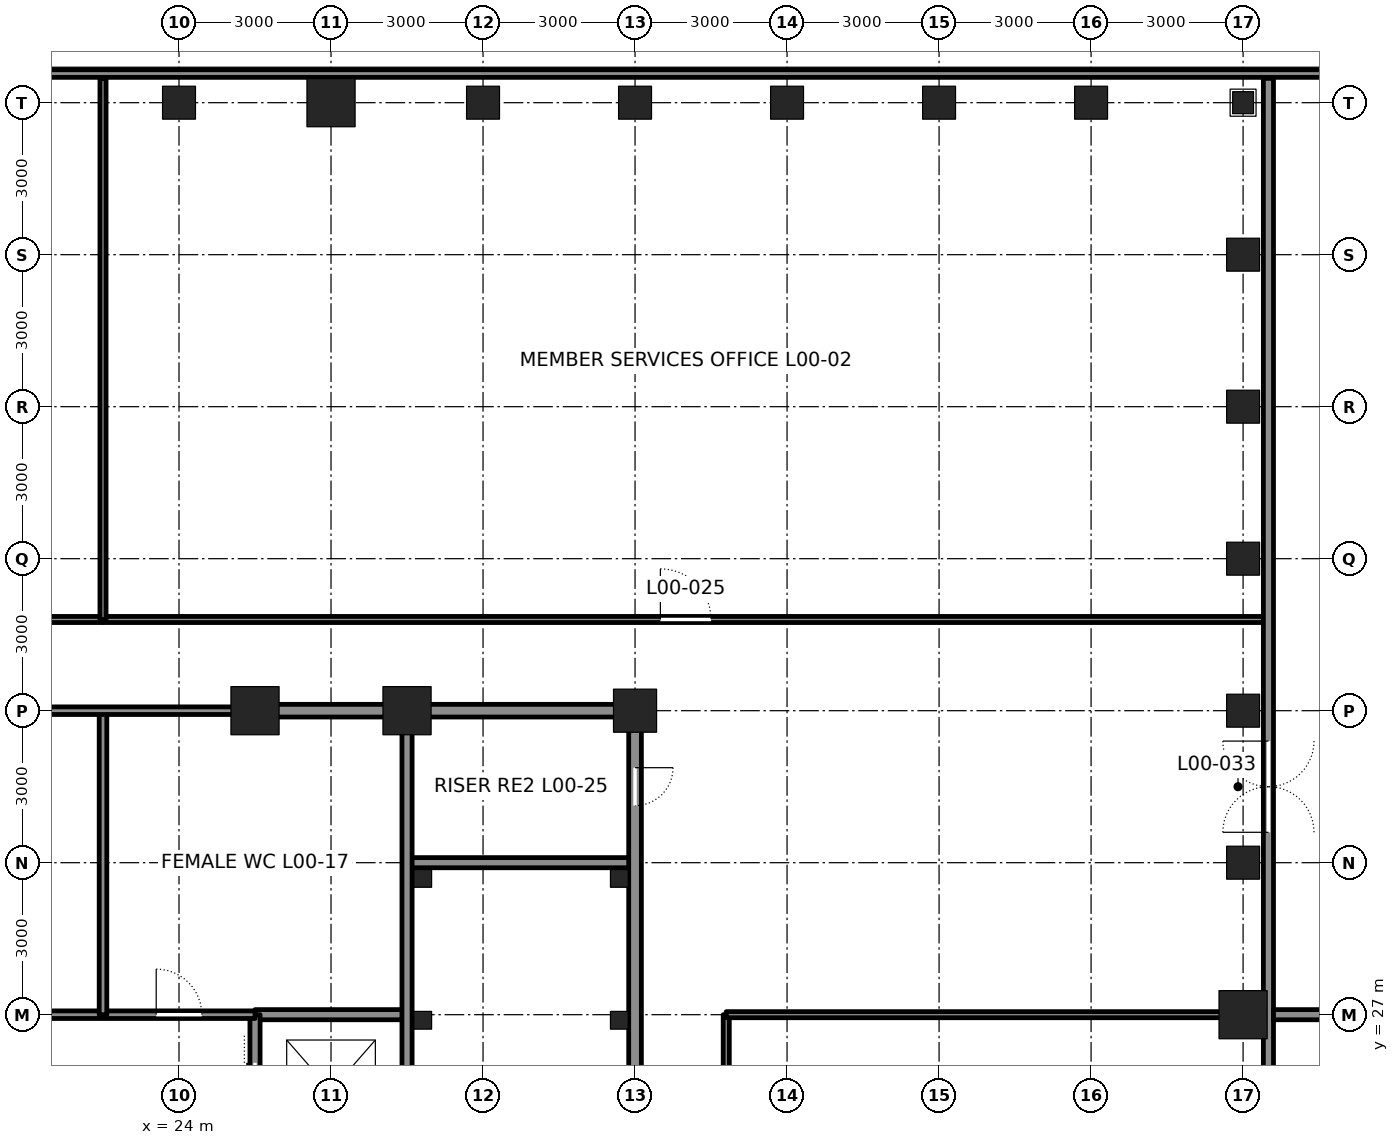
"""IFC4 building model, lengths in metres.
Left out: names, types, materials, properties, quantities, classifications, styles, units other than length and angle.
Written with IfcOpenShell. Run it as: python <this file> out.ifc"""

import sys

from ifc_helpers import new_model, si_unit, direction, frame, frame_2d, origin, origin_2d, place, context, subcontext, project, spatial, rectangle, hollow_rectangle, i_section, extrude, element, fill, save


model = new_model("IFC4")
c1 = context("Model", 3, precision=1e-05, world=origin(), true_north=direction((0.0, 1.0)))
c2 = subcontext(c1, "Body", "Model", "MODEL_VIEW")
j1 = project(units=[si_unit("LENGTHUNIT", "METRE"), si_unit("PLANEANGLEUNIT", "RADIAN")], contexts=[c1])
p1 = place(None, origin())
s1 = spatial("IfcSite", under=j1, at=p1, CompositionType="ELEMENT")
p2 = place(p1, origin())
s2 = spatial("IfcBuilding", under=s1, at=p2, CompositionType="ELEMENT")
p3 = place(p2, origin())
s3 = spatial("IfcBuildingStorey", under=s2, at=p3, CompositionType="ELEMENT", Elevation=0.0)
p4 = place(p3, frame((45.0, 27.0, 0.0), z_axis=(0.0, 0.0, 1.0), x_axis=(1.0, 0.0, 0.0)))
e1 = element("IfcColumn", 1, at=p4, inside=s3, PredefinedType="COLUMN", context=c2, shape_type="SweptSolid", body=[
    extrude(hollow_rectangle(XDim=0.95, YDim=0.95, WallThickness=0.11, at=origin_2d()), origin(), (0.0, 0.0, 1.0), 6.0),
])
for number, where, z_axis, x_axis in (
    (2, (45.0, 30.0, 0.0), (0.0, 0.0, 1.0), (1.0, 0.0, 0.0)),
    (3, (45.0, 33.0, 0.0), (0.0, 0.0, 1.0), (1.0, 0.0, 0.0)),
    (4, (45.0, 36.0, 0.0), (0.0, 0.0, 1.0), (1.0, 0.0, 0.0)),
    (5, (45.0, 39.0, 0.0), (0.0, 0.0, 1.0), (1.0, 0.0, 0.0)),
    (6, (45.0, 42.0, 0.0), (0.0, 0.0, 1.0), (1.0, 0.0, 0.0)),
    (7, (42.0, 45.0, 0.0), (0.0, 0.0, 1.0), (0.0, 1.0, 0.0)),
    (8, (39.0, 45.0, 0.0), (0.0, 0.0, 1.0), (0.0, 1.0, 0.0)),
    (9, (36.0, 45.0, 0.0), (0.0, 0.0, 1.0), (0.0, 1.0, 0.0)),
    (10, (33.0, 45.0, 0.0), (0.0, 0.0, 1.0), (0.0, 1.0, 0.0)),
    (11, (30.0, 45.0, 0.0), (0.0, 0.0, 1.0), (0.0, 1.0, 0.0)),
):
    element("IfcColumn", number, at=place(p3, frame(where, z_axis=z_axis, x_axis=x_axis)), inside=s3, PredefinedType="COLUMN", context=c2, shape_type="SweptSolid", body=[
        extrude(hollow_rectangle(XDim=0.65, YDim=0.65, WallThickness=0.065, at=origin_2d()), origin(), (0.0, 0.0, 1.0), 6.0),
    ])
p5 = place(p3, frame((27.0, 45.0, 0.0), z_axis=(0.0, 0.0, 1.0), x_axis=(0.0, 1.0, 0.0)))
e12 = element("IfcColumn", 12, at=p5, inside=s3, PredefinedType="COLUMN", context=c2, shape_type="SweptSolid", body=[
    extrude(hollow_rectangle(XDim=0.95, YDim=0.95, WallThickness=0.11, at=origin_2d()), origin(), (0.0, 0.0, 1.0), 6.0),
])
p6 = place(p3, frame((24.0, 45.0, 0.0), z_axis=(0.0, 0.0, 1.0), x_axis=(0.0, 1.0, 0.0)))
e13 = element("IfcColumn", 13, at=p6, inside=s3, PredefinedType="COLUMN", context=c2, shape_type="SweptSolid", body=[
    extrude(hollow_rectangle(XDim=0.65, YDim=0.65, WallThickness=0.065, at=origin_2d()), origin(), (0.0, 0.0, 1.0), 6.0),
])
for number, where, z_axis, x_axis in (
    (14, (25.5, 33.0, 0.0), (0.0, 0.0, 1.0), (1.0, 0.0, 0.0)),
    (15, (28.5, 33.0, 0.0), (0.0, 0.0, 1.0), (1.0, 0.0, 0.0)),
):
    element("IfcColumn", number, at=place(p3, frame(where, z_axis=z_axis, x_axis=x_axis)), inside=s3, PredefinedType="COLUMN", context=c2, shape_type="SweptSolid", body=[
        extrude(hollow_rectangle(XDim=0.95, YDim=0.95, WallThickness=0.095, at=origin_2d()), origin(), (0.0, 0.0, 1.0), 6.0),
    ])
p7 = place(p3, frame((33.0, 33.0, 0.0), z_axis=(0.0, 0.0, 1.0), x_axis=(1.0, 0.0, 0.0)))
e16 = element("IfcColumn", 16, at=p7, inside=s3, PredefinedType="COLUMN", context=c2, shape_type="SweptSolid", body=[
    extrude(hollow_rectangle(XDim=0.85, YDim=0.85, WallThickness=0.085, at=origin_2d()), origin(), (0.0, 0.0, 1.0), 6.0),
])
p8 = place(p3, frame((45.0, 45.0, 0.0), z_axis=(0.0, 0.0, 1.0), x_axis=(1.0, 0.0, 0.0)))
e17 = element("IfcColumn", 17, at=p8, inside=s3, PredefinedType="COLUMN", context=c2, shape_type="SweptSolid", body=[
    extrude(i_section(OverallWidth=0.411, OverallDepth=0.434, WebThickness=0.036, FlangeThickness=0.057, at=origin_2d()), origin(), (0.0, 0.0, 1.0), 6.0),
])
p9 = place(p3, frame((54.5, 45.575, 0.0), z_axis=(0.0, 0.0, 1.0), x_axis=(-1.0, 0.0, 0.0)))
e18 = element("IfcWall", 18, at=p9, inside=s3, PredefinedType="SOLIDWALL", context=c2, shape_type="SweptSolid", body=[
    extrude(rectangle(XDim=64.0, YDim=0.15, at=frame_2d((32.0, 0.0))), origin(), (0.0, 0.0, 1.0), 5.8),
])
p10 = place(p9, frame((56.9, 0.0, 0.0)))
e19 = element("IfcOpeningElement", 19, at=p10, cuts=e18, PredefinedType="OPENING", context=c2, shape_type="SweptSolid", body=[
    extrude(rectangle(XDim=1.2, YDim=2.1, at=frame_2d((0.6, 1.05))), frame((0.0, 0.085, 0.0), z_axis=(0.0, -1.0, 0.0), x_axis=(1.0, 0.0, 0.0)), (0.0, 0.0, 1.0), 0.17),
])
p11 = place(p9, frame((5.9, 0.0, 0.0)))
e20 = element("IfcOpeningElement", 20, at=p11, cuts=e18, PredefinedType="OPENING", context=c2, shape_type="SweptSolid", body=[
    extrude(rectangle(XDim=1.2, YDim=2.1, at=frame_2d((0.6, 1.05))), frame((0.0, 0.085, 0.0), z_axis=(0.0, -1.0, 0.0), x_axis=(1.0, 0.0, 0.0)), (0.0, 0.0, 1.0), 0.17),
])
p12 = place(p3, frame((25.5, 27.0, 0.0), z_axis=(0.0, 0.0, 1.0), x_axis=(1.0, 0.0, 0.0)))
e21 = element("IfcWall", 21, at=p12, inside=s3, PredefinedType="SOLIDWALL", context=c2, shape_type="SweptSolid", body=[
    extrude(rectangle(XDim=3.0, YDim=0.2, at=frame_2d((1.5, 0.0))), origin(), (0.0, 0.0, 1.0), 5.8),
])
p13 = place(p3, frame((28.5, 30.0, 0.0), z_axis=(0.0, 0.0, 1.0), x_axis=(1.0, 0.0, 0.0)))
e22 = element("IfcWall", 22, at=p13, inside=s3, PredefinedType="SOLIDWALL", context=c2, shape_type="SweptSolid", body=[
    extrude(rectangle(XDim=4.5, YDim=0.2, at=frame_2d((2.25, 0.0))), origin(), (0.0, 0.0, 1.0), 5.8),
])
p14 = place(p3, frame((25.75, 33.0, 0.0), z_axis=(0.0, 0.0, 1.0), x_axis=(1.0, 0.0, 0.0)))
e23 = element("IfcWall", 23, at=p14, inside=s3, PredefinedType="SOLIDWALL", context=c2, shape_type="SweptSolid", body=[
    extrude(rectangle(XDim=2.5, YDim=0.25, at=frame_2d((1.25, 0.0))), origin(), (0.0, 0.0, 1.0), 4.941),
])
p15 = place(p3, frame((28.75, 33.0, 0.0), z_axis=(0.0, 0.0, 1.0), x_axis=(1.0, 0.0, 0.0)))
e24 = element("IfcWall", 24, at=p15, inside=s3, PredefinedType="SOLIDWALL", context=c2, shape_type="SweptSolid", body=[
    extrude(rectangle(XDim=4.0, YDim=0.25, at=frame_2d((2.0, 0.0))), origin(), (0.0, 0.0, 1.0), 4.941),
])
p16 = place(p3, frame((25.5, 15.0, 0.0), z_axis=(0.0, 0.0, 1.0), x_axis=(0.0, 1.0, 0.0)))
e25 = element("IfcWall", 25, at=p16, inside=s3, PredefinedType="SOLIDWALL", context=c2, shape_type="SweptSolid", body=[
    extrude(rectangle(XDim=12.0, YDim=0.2, at=frame_2d((6.0, 0.0))), origin(), (0.0, 0.0, 1.0), 4.825),
])
p17 = place(p16, frame((0.95, 0.0, 0.0)))
e26 = element("IfcOpeningElement", 26, at=p17, cuts=e25, PredefinedType="OPENING", context=c2, shape_type="SweptSolid", body=[
    extrude(rectangle(XDim=1.1, YDim=2.1, at=frame_2d((0.55, 1.05))), frame((0.0, 0.11, 0.0), z_axis=(0.0, -1.0, 0.0), x_axis=(1.0, 0.0, 0.0)), (0.0, 0.0, 1.0), 0.22),
])
p18 = place(p16, frame((3.95, 0.0, 0.0)))
e27 = element("IfcOpeningElement", 27, at=p18, cuts=e25, PredefinedType="OPENING", context=c2, shape_type="SweptSolid", body=[
    extrude(rectangle(XDim=1.1, YDim=2.1, at=frame_2d((0.55, 1.05))), frame((0.0, 0.11, 0.0), z_axis=(0.0, -1.0, 0.0), x_axis=(1.0, 0.0, 0.0)), (0.0, 0.0, 1.0), 0.22),
])
p19 = place(p16, frame((6.95, 0.0, 0.0)))
e28 = element("IfcOpeningElement", 28, at=p19, cuts=e25, PredefinedType="OPENING", context=c2, shape_type="SweptSolid", body=[
    extrude(rectangle(XDim=1.1, YDim=2.1, at=frame_2d((0.55, 1.05))), frame((0.0, 0.11, 0.0), z_axis=(0.0, -1.0, 0.0), x_axis=(1.0, 0.0, 0.0)), (0.0, 0.0, 1.0), 0.22),
])
p20 = place(p16, frame((9.95, 0.0, 0.0)))
e29 = element("IfcOpeningElement", 29, at=p20, cuts=e25, PredefinedType="OPENING", context=c2, shape_type="SweptSolid", body=[
    extrude(rectangle(XDim=1.1, YDim=2.1, at=frame_2d((0.55, 1.05))), frame((0.0, 0.11, 0.0), z_axis=(0.0, -1.0, 0.0), x_axis=(1.0, 0.0, 0.0)), (0.0, 0.0, 1.0), 0.22),
])
p21 = place(p3, frame((28.5, 24.25, 0.0), z_axis=(0.0, 0.0, 1.0), x_axis=(0.0, 1.0, 0.0)))
e30 = element("IfcWall", 30, at=p21, inside=s3, PredefinedType="SOLIDWALL", context=c2, shape_type="SweptSolid", body=[
    extrude(rectangle(XDim=8.5, YDim=0.2, at=frame_2d((4.25, 0.0))), origin(), (0.0, 0.0, 1.0), 4.873),
])
p22 = place(p3, frame((33.0, 24.25, 0.0), z_axis=(0.0, 0.0, 1.0), x_axis=(0.0, 1.0, 0.0)))
e31 = element("IfcWall", 31, at=p22, inside=s3, PredefinedType="SOLIDWALL", context=c2, shape_type="SweptSolid", body=[
    extrude(rectangle(XDim=8.5, YDim=0.25, at=frame_2d((4.25, 0.0))), origin(), (0.0, 0.0, 1.0), 4.873),
])
p23 = place(p22, frame((6.875, 0.0, 0.0)))
e32 = element("IfcOpeningElement", 32, at=p23, cuts=e31, PredefinedType="OPENING", context=c2, shape_type="SweptSolid", body=[
    extrude(rectangle(XDim=0.75, YDim=2.1, at=frame_2d((0.375, 1.05))), frame((0.0, 0.135, 0.0), z_axis=(0.0, -1.0, 0.0), x_axis=(1.0, 0.0, 0.0)), (0.0, 0.0, 1.0), 0.27),
])
p24 = place(p3, frame((19.5, 27.0, 0.0), z_axis=(0.0, 0.0, 1.0), x_axis=(1.0, 0.0, 0.0)))
e33 = element("IfcWall", 33, at=p24, inside=s3, PredefinedType="PARTITIONING", context=c2, shape_type="SweptSolid", body=[
    extrude(rectangle(XDim=6.0, YDim=0.15, at=frame_2d((3.0, 0.0))), origin(), (0.0, 0.0, 1.0), 5.8),
])
p25 = place(p24, frame((1.05, 0.0, 0.0)))
e34 = element("IfcOpeningElement", 34, at=p25, cuts=e33, PredefinedType="OPENING", context=c2, shape_type="SweptSolid", body=[
    extrude(rectangle(XDim=0.9, YDim=2.1, at=frame_2d((0.45, 1.05))), frame((0.0, 0.085, 0.0), z_axis=(0.0, -1.0, 0.0), x_axis=(1.0, 0.0, 0.0)), (0.0, 0.0, 1.0), 0.17),
])
p26 = place(p24, frame((4.05, 0.0, 0.0)))
e35 = element("IfcOpeningElement", 35, at=p26, cuts=e33, PredefinedType="OPENING", context=c2, shape_type="SweptSolid", body=[
    extrude(rectangle(XDim=0.9, YDim=2.1, at=frame_2d((0.45, 1.05))), frame((0.0, 0.085, 0.0), z_axis=(0.0, -1.0, 0.0), x_axis=(1.0, 0.0, 0.0)), (0.0, 0.0, 1.0), 0.17),
])
p27 = place(p3, frame((22.5, 27.0, 0.0), z_axis=(0.0, 0.0, 1.0), x_axis=(0.0, 1.0, 0.0)))
e36 = element("IfcWall", 36, at=p27, inside=s3, PredefinedType="PARTITIONING", context=c2, shape_type="SweptSolid", body=[
    extrude(rectangle(XDim=6.0, YDim=0.15, at=frame_2d((3.0, 0.0))), origin(), (0.0, 0.0, 1.0), 5.8),
])
p28 = place(p3, frame((19.5, 33.0, 0.0), z_axis=(0.0, 0.0, 1.0), x_axis=(1.0, 0.0, 0.0)))
e37 = element("IfcWall", 37, at=p28, inside=s3, PredefinedType="PARTITIONING", context=c2, shape_type="SweptSolid", body=[
    extrude(rectangle(XDim=6.0, YDim=0.15, at=frame_2d((3.0, 0.0))), origin(), (0.0, 0.0, 1.0), 4.941),
])
p29 = place(p3, frame((-0.5, 34.8, 0.0), z_axis=(0.0, 0.0, 1.0), x_axis=(1.0, 0.0, 0.0)))
e38 = element("IfcWall", 38, at=p29, inside=s3, PredefinedType="PARTITIONING", context=c2, shape_type="SweptSolid", body=[
    extrude(rectangle(XDim=23.0, YDim=0.12, at=frame_2d((11.5, 0.0))), origin(), (0.0, 0.0, 1.0), 5.8),
])
p30 = place(p29, frame((11.0, 0.0, 0.0)))
e39 = element("IfcOpeningElement", 39, at=p30, cuts=e38, PredefinedType="OPENING", context=c2, shape_type="SweptSolid", body=[
    extrude(rectangle(XDim=1.0, YDim=2.4, at=frame_2d((0.5, 1.2))), frame((0.0, 0.07, 0.0), z_axis=(0.0, -1.0, 0.0), x_axis=(1.0, 0.0, 0.0)), (0.0, 0.0, 1.0), 0.14),
])
p31 = place(p3, frame((22.5, 34.8, 0.0), z_axis=(0.0, 0.0, 1.0), x_axis=(1.0, 0.0, 0.0)))
e40 = element("IfcWall", 40, at=p31, inside=s3, PredefinedType="PARTITIONING", context=c2, shape_type="SweptSolid", body=[
    extrude(rectangle(XDim=23.0, YDim=0.12, at=frame_2d((11.5, 0.0))), origin(), (0.0, 0.0, 1.0), 5.8),
])
p32 = place(p31, frame((11.0, 0.0, 0.0)))
e41 = element("IfcOpeningElement", 41, at=p32, cuts=e40, PredefinedType="OPENING", context=c2, shape_type="SweptSolid", body=[
    extrude(rectangle(XDim=1.0, YDim=2.4, at=frame_2d((0.5, 1.2))), frame((0.0, 0.07, 0.0), z_axis=(0.0, -1.0, 0.0), x_axis=(1.0, 0.0, 0.0)), (0.0, 0.0, 1.0), 0.14),
])
p33 = place(p3, frame((34.8, 12.0, 0.0), z_axis=(0.0, 0.0, 1.0), x_axis=(0.0, 1.0, 0.0)))
e42 = element("IfcWall", 42, at=p33, inside=s3, PredefinedType="PARTITIONING", context=c2, shape_type="SweptSolid", body=[
    extrude(rectangle(XDim=15.0, YDim=0.12, at=frame_2d((7.5, 0.0))), origin(), (0.0, 0.0, 1.0), 5.8),
])
p34 = place(p33, frame((7.0, 0.0, 0.0)))
e43 = element("IfcOpeningElement", 43, at=p34, cuts=e42, PredefinedType="OPENING", context=c2, shape_type="SweptSolid", body=[
    extrude(rectangle(XDim=1.0, YDim=2.4, at=frame_2d((0.5, 1.2))), frame((0.0, 0.07, 0.0), z_axis=(0.0, -1.0, 0.0), x_axis=(1.0, 0.0, 0.0)), (0.0, 0.0, 1.0), 0.14),
])
p35 = place(p3, frame((22.5, 34.8, 0.0), z_axis=(0.0, 0.0, 1.0), x_axis=(0.0, 1.0, 0.0)))
e44 = element("IfcWall", 44, at=p35, inside=s3, PredefinedType="PARTITIONING", context=c2, shape_type="SweptSolid", body=[
    extrude(rectangle(XDim=10.68, YDim=0.12, at=frame_2d((5.34, 0.0))), origin(), (0.0, 0.0, 1.0), 5.8),
])
p36 = place(p3, frame((34.8, 27.0, 0.0), z_axis=(0.0, 0.0, 1.0), x_axis=(1.0, 0.0, 0.0)))
e45 = element("IfcWall", 45, at=p36, inside=s3, PredefinedType="PARTITIONING", context=c2, shape_type="SweptSolid", body=[
    extrude(rectangle(XDim=10.7, YDim=0.12, at=frame_2d((5.35, 0.0))), origin(), (0.0, 0.0, 1.0), 4.853),
])
p37 = place(p3, frame((45.5, -0.5, 0.0), z_axis=(0.0, 0.0, 1.0), x_axis=(0.0, 1.0, 0.0)))
e46 = element("IfcWall", 46, at=p37, inside=s3, PredefinedType="PARTITIONING", context=c2, shape_type="SweptSolid", body=[
    extrude(rectangle(XDim=45.98, YDim=0.2, at=frame_2d((22.99, 0.0))), origin(), (0.0, 0.0, 1.0), 5.8),
])
p38 = place(p37, frame((10.1, 0.0, 0.0)))
e47 = element("IfcOpeningElement", 47, at=p38, cuts=e46, PredefinedType="OPENING", context=c2, shape_type="SweptSolid", body=[
    extrude(rectangle(XDim=1.8, YDim=2.4, at=frame_2d((0.9, 1.2))), frame((0.0, 0.11, 0.0), z_axis=(0.0, -1.0, 0.0), x_axis=(1.0, 0.0, 0.0)), (0.0, 0.0, 1.0), 0.22),
])
p39 = place(p37, frame((31.1, 0.0, 0.0)))
e48 = element("IfcOpeningElement", 48, at=p39, cuts=e46, PredefinedType="OPENING", context=c2, shape_type="SweptSolid", body=[
    extrude(rectangle(XDim=1.8, YDim=2.4, at=frame_2d((0.9, 1.2))), frame((0.0, 0.11, 0.0), z_axis=(0.0, -1.0, 0.0), x_axis=(1.0, 0.0, 0.0)), (0.0, 0.0, 1.0), 0.22),
])
p40 = place(p3, frame((45.6, 27.0, 0.0), z_axis=(0.0, 0.0, 1.0), x_axis=(1.0, 0.0, 0.0)))
e49 = element("IfcWall", 49, at=p40, inside=s3, PredefinedType="PARTITIONING", context=c2, shape_type="SweptSolid", body=[
    extrude(rectangle(XDim=8.1, YDim=0.2, at=frame_2d((4.05, 0.0))), origin(), (0.0, 0.0, 1.0), 4.853),
])
for number, where, z_axis, x_axis in (
    (50, (28.81, 29.69, 0.0), (0.0, 0.0, 1.0), (1.0, 0.0, 0.0)),
    (51, (32.69, 29.69, 0.0), (0.0, 0.0, 1.0), (1.0, 0.0, 0.0)),
    (52, (28.81, 26.89, 0.0), (0.0, 0.0, 1.0), (1.0, 0.0, 0.0)),
    (53, (32.69, 26.89, 0.0), (0.0, 0.0, 1.0), (1.0, 0.0, 0.0)),
):
    element("IfcColumn", number, at=place(p3, frame(where, z_axis=z_axis, x_axis=x_axis)), inside=s3, PredefinedType="COLUMN", context=c2, shape_type="SweptSolid", body=[
        extrude(hollow_rectangle(XDim=0.35, YDim=0.35, WallThickness=0.035, at=origin_2d()), origin(), (0.0, 0.0, 1.0), 6.0),
    ])
p41 = place(p23, frame((0.75, 0.0, 0.0), z_axis=(0.0, 0.0, 1.0), x_axis=(-1.0, 0.0, 0.0)))
e54 = element("IfcDoor", 54, at=p41, inside=s3, OperationType="SINGLE_SWING_LEFT", PredefinedType="DOOR", context=c2, shape_type="SweptSolid", body=[
    extrude(rectangle(XDim=0.75, YDim=2.1, at=frame_2d((0.375, 1.05))), frame((0.0, 0.025, 0.0), z_axis=(0.0, -1.0, 0.0), x_axis=(1.0, 0.0, 0.0)), (0.0, 0.0, 1.0), 0.05),
])
fill(e32, e54)
p42 = place(p26, origin())
e55 = element("IfcDoor", 55, at=p42, inside=s3, OperationType="SINGLE_SWING_LEFT", PredefinedType="DOOR", context=c2, shape_type="SweptSolid", body=[
    extrude(rectangle(XDim=0.9, YDim=2.1, at=frame_2d((0.45, 1.05))), frame((0.0, 0.025, 0.0), z_axis=(0.0, -1.0, 0.0), x_axis=(1.0, 0.0, 0.0)), (0.0, 0.0, 1.0), 0.05),
])
fill(e35, e55)
p43 = place(p20, origin())
e56 = element("IfcDoor", 56, at=p43, inside=s3, OperationType="DOUBLE_DOOR_SLIDING", PredefinedType="DOOR", context=c2, shape_type="SweptSolid", body=[
    extrude(rectangle(XDim=1.1, YDim=2.1, at=frame_2d((0.55, 1.05))), frame((0.0, 0.025, 0.0), z_axis=(0.0, -1.0, 0.0), x_axis=(1.0, 0.0, 0.0)), (0.0, 0.0, 1.0), 0.05),
])
fill(e29, e56)
p44 = place(p32, origin())
e57 = element("IfcDoor", 57, at=p44, inside=s3, OperationType="SINGLE_SWING_LEFT", PredefinedType="DOOR", context=c2, shape_type="SweptSolid", body=[
    extrude(rectangle(XDim=1.0, YDim=2.4, at=frame_2d((0.5, 1.2))), frame((0.0, 0.025, 0.0), z_axis=(0.0, -1.0, 0.0), x_axis=(1.0, 0.0, 0.0)), (0.0, 0.0, 1.0), 0.05),
])
fill(e41, e57)
p45 = place(p39, origin())
e58 = element("IfcDoor", 58, at=p45, inside=s3, OperationType="DOUBLE_DOOR_DOUBLE_SWING", PredefinedType="DOOR", context=c2, shape_type="SweptSolid", body=[
    extrude(rectangle(XDim=1.8, YDim=2.4, at=frame_2d((0.9, 1.2))), frame((0.0, 0.025, 0.0), z_axis=(0.0, -1.0, 0.0), x_axis=(1.0, 0.0, 0.0)), (0.0, 0.0, 1.0), 0.05),
])
fill(e48, e58)
save(model, sys.argv[1])
